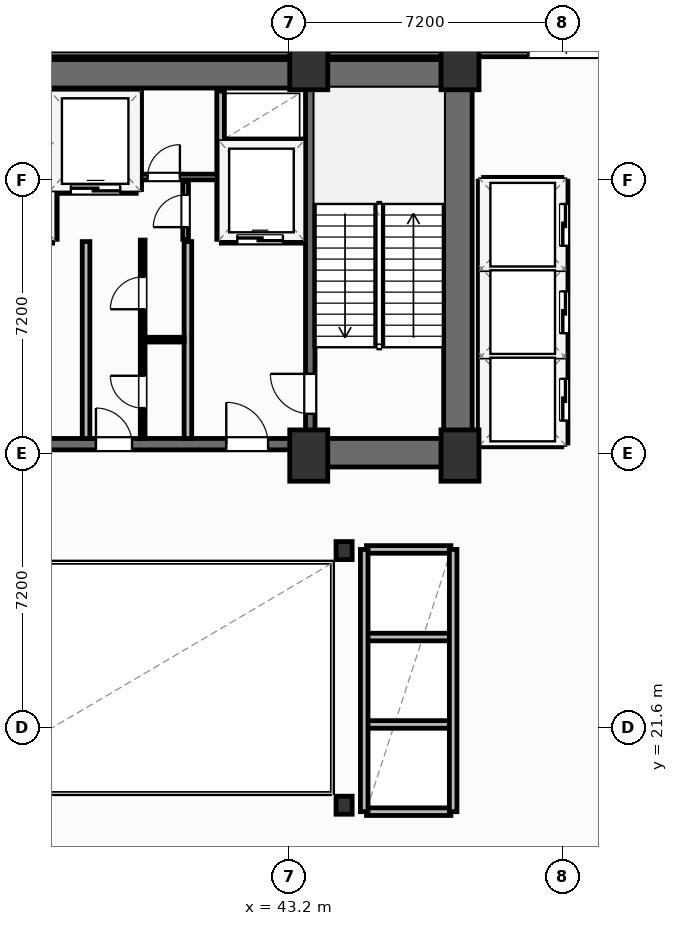
"""IFC4 building model, lengths in metres.
Left out: names, types, materials, properties, quantities, classifications, styles, units other than length and angle.
Written with IfcOpenShell. Run it as: python <this file> out.ifc"""

import sys

from ifc_helpers import new_model, si_unit, direction, frame, frame_2d, origin, origin_2d, place, context, subcontext, project, spatial, rectangle, i_section, extrude, element, fill, save


model = new_model("IFC4")
c1 = context("Model", 3, precision=1e-05, world=origin(), true_north=direction((0.0, 1.0)))
c2 = subcontext(c1, "Body", "Model", "MODEL_VIEW")
j1 = project(units=[si_unit("LENGTHUNIT", "METRE"), si_unit("PLANEANGLEUNIT", "RADIAN")], contexts=[c1])
p1 = place(None, origin())
s1 = spatial("IfcSite", under=j1, at=p1, CompositionType="ELEMENT")
p2 = place(p1, origin())
s2 = spatial("IfcBuilding", under=s1, at=p2, CompositionType="ELEMENT")
p3 = place(p2, frame((0.0, 0.0, 116.9)))
s3 = spatial("IfcBuildingStorey", under=s2, at=p3, CompositionType="ELEMENT", Elevation=116.9)
for number, where, z_axis, x_axis in (
    (1, (43.72, 28.75, 0.0), (0.0, 0.0, 1.0), (1.0, 0.0, 0.0)),
    (2, (47.7, 28.75, 0.0), (0.0, 0.0, 1.0), (1.0, 0.0, 0.0)),
    (3, (43.72, 39.05, 0.0), (0.0, 0.0, 1.0), (1.0, 0.0, 0.0)),
    (4, (47.7, 39.05, 0.0), (0.0, 0.0, 1.0), (1.0, 0.0, 0.0)),
):
    element("IfcColumn", number, at=place(p3, frame(where, z_axis=z_axis, x_axis=x_axis)), inside=s3, PredefinedType="COLUMN", context=c2, shape_type="SweptSolid", body=[
        extrude(rectangle(XDim=1.0, YDim=1.35, at=origin_2d()), origin(), (0.0, 0.0, 1.0), 4.8),
    ])
for number, where, z_axis, x_axis in (
    (5, (44.65, 19.55, 0.0), (0.0, 0.0, 1.0), (1.0, 0.0, 0.0)),
    (6, (44.65, 26.25, 0.0), (0.0, 0.0, 1.0), (1.0, 0.0, 0.0)),
):
    element("IfcColumn", number, at=place(p3, frame(where, z_axis=z_axis, x_axis=x_axis)), inside=s3, PredefinedType="COLUMN", context=c2, shape_type="SweptSolid", body=[
        extrude(i_section(OverallWidth=0.424, OverallDepth=0.474, WebThickness=0.048, FlangeThickness=0.077, FilletRadius=0.025, at=origin_2d()), origin(), (0.0, 0.0, 1.0), 4.8),
    ])
p4 = place(p3, frame((30.38, 38.795, 0.0), z_axis=(0.0, 0.0, 1.0), x_axis=(1.0, 0.0, 0.0)))
e7 = element("IfcWall", 7, at=p4, inside=s3, PredefinedType="SHEAR", context=c2, shape_type="SweptSolid", body=[
    extrude(rectangle(XDim=17.64, YDim=0.75, at=frame_2d((8.82, 0.0))), origin(), (0.0, 0.0, 1.0), 4.55),
])
p5 = place(p3, frame((47.645, 29.2, 0.0), z_axis=(0.0, 0.0, 1.0), x_axis=(0.0, 1.0, 0.0)))
e8 = element("IfcWall", 8, at=p5, inside=s3, PredefinedType="SHEAR", context=c2, shape_type="SweptSolid", body=[
    extrude(rectangle(XDim=9.22, YDim=0.75, at=frame_2d((4.61, 0.0))), origin(), (0.0, 0.0, 1.0), 4.55),
])
p6 = place(p3, frame((43.6, 28.825, 0.0), z_axis=(0.0, 0.0, 1.0), x_axis=(1.0, 0.0, 0.0)))
e9 = element("IfcWall", 9, at=p6, inside=s3, PredefinedType="SHEAR", context=c2, shape_type="SweptSolid", body=[
    extrude(rectangle(XDim=4.42, YDim=0.75, at=frame_2d((2.21, 0.0))), origin(), (0.0, 0.0, 1.0), 4.55),
])
p7 = place(p3, frame((34.8, 29.05, 0.0), z_axis=(0.0, 0.0, 1.0), x_axis=(1.0, 0.0, 0.0)))
e10 = element("IfcWall", 10, at=p7, inside=s3, PredefinedType="SHEAR", context=c2, shape_type="SweptSolid", body=[
    extrude(rectangle(XDim=8.8, YDim=0.3, at=frame_2d((4.4, 0.0))), origin(), (0.0, 0.0, 1.0), 4.55),
])
p8 = place(p7, frame((0.95, 0.0, 0.0)))
e11 = element("IfcOpeningElement", 11, at=p8, cuts=e10, PredefinedType="OPENING", context=c2, shape_type="SweptSolid", body=[
    extrude(rectangle(XDim=1.1, YDim=2.15, at=frame_2d((0.55, 1.075))), frame((0.0, 0.16, 0.0), z_axis=(0.0, -1.0, 0.0), x_axis=(1.0, 0.0, 0.0)), (0.0, 0.0, 1.0), 0.32),
])
p9 = place(p7, frame((6.75, 0.0, 0.0)))
e12 = element("IfcOpeningElement", 12, at=p9, cuts=e10, PredefinedType="OPENING", context=c2, shape_type="SweptSolid", body=[
    extrude(rectangle(XDim=1.1, YDim=2.15, at=frame_2d((0.55, 1.075))), frame((0.0, 0.16, 0.0), z_axis=(0.0, -1.0, 0.0), x_axis=(1.0, 0.0, 0.0)), (0.0, 0.0, 1.0), 0.32),
])
p10 = place(p7, frame((3.32, 0.0, 0.0)))
e13 = element("IfcOpeningElement", 13, at=p10, cuts=e10, PredefinedType="OPENING", context=c2, shape_type="SweptSolid", body=[
    extrude(rectangle(XDim=0.95, YDim=2.15, at=frame_2d((0.475, 1.075))), frame((0.0, 0.16, 0.0), z_axis=(0.0, -1.0, 0.0), x_axis=(1.0, 0.0, 0.0)), (0.0, 0.0, 1.0), 0.32),
])
p11 = place(p3, frame((43.76, 29.2, 0.0), z_axis=(0.0, 0.0, 1.0), x_axis=(0.0, 1.0, 0.0)))
e14 = element("IfcWall", 14, at=p11, inside=s3, PredefinedType="SHEAR", context=c2, shape_type="SweptSolid", body=[
    extrude(rectangle(XDim=9.22, YDim=0.25, at=frame_2d((4.61, 0.0))), origin(), (0.0, 0.0, 1.0), 4.55),
])
p12 = place(p11, frame((0.65, 0.0, 0.0)))
e15 = element("IfcOpeningElement", 15, at=p12, cuts=e14, PredefinedType="OPENING", context=c2, shape_type="SweptSolid", body=[
    extrude(rectangle(XDim=1.05, YDim=2.15, at=frame_2d((0.525, 1.075))), frame((0.0, 0.135, 0.0), z_axis=(0.0, -1.0, 0.0), x_axis=(1.0, 0.0, 0.0)), (0.0, 0.0, 1.0), 0.27),
])
p13 = place(p3, frame((10.0, 39.32, 0.0), z_axis=(0.0, 0.0, 1.0), x_axis=(1.0, 0.0, 0.0)))
e16 = element("IfcWall", 16, at=p13, inside=s3, PredefinedType="PARTITIONING", context=c2, shape_type="SweptSolid", body=[
    extrude(rectangle(XDim=62.0, YDim=0.15, at=frame_2d((31.0, 0.0))), origin(), (0.0, 0.0, 1.0), 4.55),
])
p14 = place(p13, frame((15.6, 0.0, 0.0)))
e17 = element("IfcOpeningElement", 17, at=p14, cuts=e16, PredefinedType="OPENING", context=c2, shape_type="SweptSolid", body=[
    extrude(rectangle(XDim=1.0, YDim=2.05, at=frame_2d((0.5, 1.025))), frame((0.0, 0.085, 0.0), z_axis=(0.0, -1.0, 0.0), x_axis=(1.0, 0.0, 0.0)), (0.0, 0.0, 1.0), 0.17),
])
p15 = place(p13, frame((39.5, 0.0, 0.0)))
e18 = element("IfcOpeningElement", 18, at=p15, cuts=e16, PredefinedType="OPENING", context=c2, shape_type="SweptSolid", body=[
    extrude(rectangle(XDim=2.0, YDim=2.05, at=frame_2d((1.0, 1.025))), frame((0.0, 0.085, 0.0), z_axis=(0.0, -1.0, 0.0), x_axis=(1.0, 0.0, 0.0)), (0.0, 0.0, 1.0), 0.17),
])
p16 = place(p3, frame((44.15, 39.32, 0.0), z_axis=(0.0, 0.0, 1.0), x_axis=(0.0, 1.0, 0.0)))
e19 = element("IfcWall", 19, at=p16, inside=s3, PredefinedType="PARTITIONING", context=c2, shape_type="SweptSolid", body=[
    extrude(rectangle(XDim=6.594, YDim=0.15, at=frame_2d((3.297, 0.0))), origin(), (0.0, 0.0, 1.0), 4.55),
])
for number, where, z_axis, x_axis in (
    (20, (37.86, 29.2, 0.0), (0.0, 0.0, 1.0), (0.0, 1.0, 0.0)),
    (21, (40.54, 29.2, 0.0), (0.0, 0.0, 1.0), (0.0, 1.0, 0.0)),
):
    element("IfcWall", number, at=place(p3, frame(where, z_axis=z_axis, x_axis=x_axis)), inside=s3, PredefinedType="PARTITIONING", context=c2, shape_type="SweptSolid", body=[
        extrude(rectangle(XDim=5.18, YDim=0.2, at=frame_2d((2.59, 0.0))), origin(), (0.0, 0.0, 1.0), 4.55),
    ])
p17 = place(p3, frame((37.0, 34.44, 0.0), z_axis=(0.0, 0.0, 1.0), x_axis=(0.0, 1.0, 0.0)))
e22 = element("IfcWall", 22, at=p17, inside=s3, PredefinedType="PARTITIONING", context=c2, shape_type="SweptSolid", body=[
    extrude(rectangle(XDim=3.9, YDim=0.2, at=frame_2d((1.95, 0.0))), origin(), (0.0, 0.0, 1.0), 4.55),
])
p18 = place(p3, frame((41.42, 34.44, 0.0), z_axis=(0.0, 0.0, 1.0), x_axis=(1.0, 0.0, 0.0)))
e23 = element("IfcWall", 23, at=p18, inside=s3, PredefinedType="PARTITIONING", context=c2, shape_type="SweptSolid", body=[
    extrude(rectangle(XDim=2.18, YDim=0.2, at=frame_2d((1.09, 0.0))), origin(), (0.0, 0.0, 1.0), 4.55),
])
p19 = place(p18, frame((0.42, 0.0, 0.0)))
e24 = element("IfcOpeningElement", 24, at=p19, cuts=e23, PredefinedType="OPENING", context=c2, shape_type="SweptSolid", body=[
    extrude(rectangle(XDim=1.2, YDim=2.2, at=frame_2d((0.6, 1.1))), frame((0.0, 0.11, 0.0), z_axis=(0.0, -1.0, 0.0), x_axis=(1.0, 0.0, 0.0)), (0.0, 0.0, 1.0), 0.22),
])
p20 = place(p3, frame((41.42, 36.98, 0.0), z_axis=(0.0, 0.0, 1.0), x_axis=(1.0, 0.0, 0.0)))
e25 = element("IfcWall", 25, at=p20, inside=s3, PredefinedType="PARTITIONING", context=c2, shape_type="SweptSolid", body=[
    extrude(rectangle(XDim=2.18, YDim=0.2, at=frame_2d((1.09, 0.0))), origin(), (0.0, 0.0, 1.0), 4.55),
])
p21 = place(p3, frame((41.4, 34.44, 0.0), z_axis=(0.0, 0.0, 1.0), x_axis=(0.0, 1.0, 0.0)))
e26 = element("IfcWall", 26, at=p21, inside=s3, PredefinedType="PARTITIONING", context=c2, shape_type="SweptSolid", body=[
    extrude(rectangle(XDim=3.9, YDim=0.2, at=frame_2d((1.95, 0.0))), origin(), (0.0, 0.0, 1.0), 4.55),
])
p22 = place(p3, frame((37.06, 35.75, 0.0), z_axis=(0.0, 0.0, 1.0), x_axis=(1.0, 0.0, 0.0)))
e27 = element("IfcWall", 27, at=p22, inside=s3, PredefinedType="PARTITIONING", context=c2, shape_type="SweptSolid", body=[
    extrude(rectangle(XDim=2.12, YDim=0.2, at=frame_2d((1.06, 0.0))), origin(), (0.0, 0.0, 1.0), 4.55),
])
p23 = place(p22, frame((0.4, 0.0, 0.0)))
e28 = element("IfcOpeningElement", 28, at=p23, cuts=e27, PredefinedType="OPENING", context=c2, shape_type="SweptSolid", body=[
    extrude(rectangle(XDim=1.3, YDim=2.2, at=frame_2d((0.65, 1.1))), frame((0.0, 0.11, 0.0), z_axis=(0.0, -1.0, 0.0), x_axis=(1.0, 0.0, 0.0)), (0.0, 0.0, 1.0), 0.22),
])
p24 = place(p3, frame((39.22, 35.75, 0.0), z_axis=(0.0, 0.0, 1.0), x_axis=(0.0, 1.0, 0.0)))
e29 = element("IfcWall", 29, at=p24, inside=s3, PredefinedType="PARTITIONING", context=c2, shape_type="SweptSolid", body=[
    extrude(rectangle(XDim=2.59, YDim=0.2, at=frame_2d((1.295, 0.0))), origin(), (0.0, 0.0, 1.0), 4.55),
])
p25 = place(p3, frame((39.3, 36.08, 0.0), z_axis=(0.0, 0.0, 1.0), x_axis=(1.0, 0.0, 0.0)))
e30 = element("IfcWall", 30, at=p25, inside=s3, PredefinedType="PARTITIONING", context=c2, shape_type="SweptSolid", body=[
    extrude(rectangle(XDim=2.02, YDim=0.15, at=frame_2d((1.01, 0.0))), origin(), (0.0, 0.0, 1.0), 4.55),
])
p26 = place(p25, frame((0.18, 0.0, 0.0)))
e31 = element("IfcOpeningElement", 31, at=p26, cuts=e30, PredefinedType="OPENING", context=c2, shape_type="SweptSolid", body=[
    extrude(rectangle(XDim=0.85, YDim=2.05, at=frame_2d((0.425, 1.025))), frame((0.0, 0.085, 0.0), z_axis=(0.0, -1.0, 0.0), x_axis=(1.0, 0.0, 0.0)), (0.0, 0.0, 1.0), 0.17),
])
p27 = place(p3, frame((40.48, 34.44, 0.0), z_axis=(0.0, 0.0, 1.0), x_axis=(0.0, 1.0, 0.0)))
e32 = element("IfcWall", 32, at=p27, inside=s3, PredefinedType="PARTITIONING", context=c2, shape_type="SweptSolid", body=[
    extrude(rectangle(XDim=1.52, YDim=0.15, at=frame_2d((0.76, 0.0))), origin(), (0.0, 0.0, 1.0), 4.55),
])
p28 = place(p27, frame((0.32, 0.0, 0.0)))
e33 = element("IfcOpeningElement", 33, at=p28, cuts=e32, PredefinedType="OPENING", context=c2, shape_type="SweptSolid", body=[
    extrude(rectangle(XDim=0.85, YDim=2.05, at=frame_2d((0.425, 1.025))), frame((0.0, 0.085, 0.0), z_axis=(0.0, -1.0, 0.0), x_axis=(1.0, 0.0, 0.0)), (0.0, 0.0, 1.0), 0.17),
])
p29 = place(p3, frame((39.35, 31.8, 0.0), z_axis=(0.0, 0.0, 1.0), x_axis=(1.0, 0.0, 0.0)))
e34 = element("IfcWall", 34, at=p29, inside=s3, PredefinedType="PARTITIONING", context=c2, shape_type="SweptSolid", body=[
    extrude(rectangle(XDim=1.09, YDim=0.125, at=frame_2d((0.545, 0.0))), origin(), (0.0, 0.0, 1.0), 4.55),
])
p30 = place(p3, frame((39.35, 29.2, 0.0), z_axis=(0.0, 0.0, 1.0), x_axis=(0.0, 1.0, 0.0)))
e35 = element("IfcWall", 35, at=p30, inside=s3, PredefinedType="PARTITIONING", context=c2, shape_type="SweptSolid", body=[
    extrude(rectangle(XDim=5.22, YDim=0.125, at=frame_2d((2.61, 0.0))), origin(), (0.0, 0.0, 1.0), 4.55),
])
p31 = place(p30, frame((0.8, 0.0, 0.0)))
e36 = element("IfcOpeningElement", 36, at=p31, cuts=e35, PredefinedType="OPENING", context=c2, shape_type="SweptSolid", body=[
    extrude(rectangle(XDim=0.85, YDim=2.05, at=frame_2d((0.425, 1.025))), frame((0.0, 0.073, 0.0), z_axis=(0.0, -1.0, 0.0), x_axis=(1.0, 0.0, 0.0)), (0.0, 0.0, 1.0), 0.145),
])
p32 = place(p30, frame((3.4, 0.0, 0.0)))
e37 = element("IfcOpeningElement", 37, at=p32, cuts=e35, PredefinedType="OPENING", context=c2, shape_type="SweptSolid", body=[
    extrude(rectangle(XDim=0.85, YDim=2.05, at=frame_2d((0.425, 1.025))), frame((0.0, 0.073, 0.0), z_axis=(0.0, -1.0, 0.0), x_axis=(1.0, 0.0, 0.0)), (0.0, 0.0, 1.0), 0.145),
])
for number, where, z_axis, x_axis in (
    (38, (48.32, 31.375, 0.0), (0.0, 0.0, 1.0), (1.0, 0.0, 0.0)),
    (39, (48.32, 33.675, 0.0), (0.0, 0.0, 1.0), (1.0, 0.0, 0.0)),
):
    element("IfcWall", number, at=place(p3, frame(where, z_axis=z_axis, x_axis=x_axis)), inside=s3, PredefinedType="PARTITIONING", context=c2, shape_type="SweptSolid", body=[
        extrude(rectangle(XDim=2.06, YDim=0.2, at=frame_2d((1.03, 0.0))), origin(), (0.0, 0.0, 1.0), 4.55),
    ])
p33 = place(p3, frame((48.32, 29.08, 0.0), z_axis=(0.0, 0.0, 1.0), x_axis=(1.0, 0.0, 0.0)))
e40 = element("IfcWall", 40, at=p33, inside=s3, PredefinedType="PARTITIONING", context=c2, shape_type="SweptSolid", body=[
    extrude(rectangle(XDim=2.06, YDim=0.2, at=frame_2d((1.03, 0.0))), origin(), (0.0, 0.0, 1.0), 3.762),
])
p34 = place(p3, frame((48.32, 35.97, 0.0), z_axis=(0.0, 0.0, 1.0), x_axis=(1.0, 0.0, 0.0)))
e41 = element("IfcWall", 41, at=p34, inside=s3, PredefinedType="PARTITIONING", context=c2, shape_type="SweptSolid", body=[
    extrude(rectangle(XDim=2.06, YDim=0.2, at=frame_2d((1.03, 0.0))), origin(), (0.0, 0.0, 1.0), 4.55),
])
p35 = place(p3, frame((48.28, 29.08, 0.0), z_axis=(0.0, 0.0, 1.0), x_axis=(0.0, 1.0, 0.0)))
e42 = element("IfcWall", 42, at=p35, inside=s3, PredefinedType="PARTITIONING", context=c2, shape_type="SweptSolid", body=[
    extrude(rectangle(XDim=6.89, YDim=0.2, at=frame_2d((3.445, 0.0))), origin(), (0.0, 0.0, 1.0), 4.55),
])
p36 = place(p3, frame((50.44, 29.08, 0.0), z_axis=(0.0, 0.0, 1.0), x_axis=(0.0, 1.0, 0.0)))
e43 = element("IfcWall", 43, at=p36, inside=s3, PredefinedType="PARTITIONING", context=c2, shape_type="SweptSolid", body=[
    extrude(rectangle(XDim=6.89, YDim=0.2, at=frame_2d((3.445, 0.0))), origin(), (0.0, 0.0, 1.0), 4.55),
])
p37 = place(p36, frame((0.59, 0.0, 0.0)))
e44 = element("IfcOpeningElement", 44, at=p37, cuts=e43, PredefinedType="OPENING", context=c2, shape_type="SweptSolid", body=[
    extrude(rectangle(XDim=1.1, YDim=2.15, at=frame_2d((0.55, 1.075))), frame((0.0, 0.11, 0.0), z_axis=(0.0, -1.0, 0.0), x_axis=(1.0, 0.0, 0.0)), (0.0, 0.0, 1.0), 0.22),
])
p38 = place(p36, frame((2.89, 0.0, 0.0)))
e45 = element("IfcOpeningElement", 45, at=p38, cuts=e43, PredefinedType="OPENING", context=c2, shape_type="SweptSolid", body=[
    extrude(rectangle(XDim=1.1, YDim=2.15, at=frame_2d((0.55, 1.075))), frame((0.0, 0.11, 0.0), z_axis=(0.0, -1.0, 0.0), x_axis=(1.0, 0.0, 0.0)), (0.0, 0.0, 1.0), 0.22),
])
p39 = place(p36, frame((5.19, 0.0, 0.0)))
e46 = element("IfcOpeningElement", 46, at=p39, cuts=e43, PredefinedType="OPENING", context=c2, shape_type="SweptSolid", body=[
    extrude(rectangle(XDim=1.1, YDim=2.15, at=frame_2d((0.55, 1.075))), frame((0.0, 0.11, 0.0), z_axis=(0.0, -1.0, 0.0), x_axis=(1.0, 0.0, 0.0)), (0.0, 0.0, 1.0), 0.22),
])
for number, where, z_axis, x_axis in (
    (47, (45.24, 21.675, 0.0), (0.0, 0.0, 1.0), (1.0, 0.0, 0.0)),
    (48, (45.24, 23.975, 0.0), (0.0, 0.0, 1.0), (1.0, 0.0, 0.0)),
):
    element("IfcWall", number, at=place(p3, frame(where, z_axis=z_axis, x_axis=x_axis)), inside=s3, PredefinedType="PARTITIONING", context=c2, shape_type="SweptSolid", body=[
        extrude(rectangle(XDim=2.22, YDim=0.2, at=frame_2d((1.11, 0.0))), origin(), (0.0, 0.0, 1.0), 4.55),
    ])
p40 = place(p3, frame((45.24, 19.38, 0.0), z_axis=(0.0, 0.0, 1.0), x_axis=(1.0, 0.0, 0.0)))
e49 = element("IfcWall", 49, at=p40, inside=s3, PredefinedType="PARTITIONING", context=c2, shape_type="SweptSolid", body=[
    extrude(rectangle(XDim=2.22, YDim=0.2, at=frame_2d((1.11, 0.0))), origin(), (0.0, 0.0, 1.0), 3.762),
])
p41 = place(p3, frame((45.24, 26.28, 0.0), z_axis=(0.0, 0.0, 1.0), x_axis=(1.0, 0.0, 0.0)))
e50 = element("IfcWall", 50, at=p41, inside=s3, PredefinedType="PARTITIONING", context=c2, shape_type="SweptSolid", body=[
    extrude(rectangle(XDim=2.22, YDim=0.2, at=frame_2d((1.11, 0.0))), origin(), (0.0, 0.0, 1.0), 4.55),
])
for number, where, z_axis, x_axis in (
    (51, (45.18, 19.38, 0.0), (0.0, 0.0, 1.0), (0.0, 1.0, 0.0)),
    (52, (47.52, 19.38, 0.0), (0.0, 0.0, 1.0), (0.0, 1.0, 0.0)),
):
    element("IfcWall", number, at=place(p3, frame(where, z_axis=z_axis, x_axis=x_axis)), inside=s3, PredefinedType="PARTITIONING", context=c2, shape_type="SweptSolid", body=[
        extrude(rectangle(XDim=6.9, YDim=0.2, at=frame_2d((3.45, 0.0))), origin(), (0.0, 0.0, 1.0), 4.55),
    ])
p42 = place(p15, origin())
e53 = element("IfcDoor", 53, at=p42, inside=s3, OperationType="DOUBLE_DOOR_SINGLE_SWING", PredefinedType="DOOR", context=c2, shape_type="SweptSolid", body=[
    extrude(rectangle(XDim=2.0, YDim=2.05, at=frame_2d((1.0, 1.025))), frame((0.0, 0.025, 0.0), z_axis=(0.0, -1.0, 0.0), x_axis=(1.0, 0.0, 0.0)), (0.0, 0.0, 1.0), 0.05),
])
fill(e18, e53)
p43 = place(p12, origin())
e54 = element("IfcDoor", 54, at=p43, inside=s3, OperationType="SINGLE_SWING_RIGHT", PredefinedType="DOOR", context=c2, shape_type="SweptSolid", body=[
    extrude(rectangle(XDim=1.05, YDim=2.15, at=frame_2d((0.525, 1.075))), frame((0.0, 0.025, 0.0), z_axis=(0.0, -1.0, 0.0), x_axis=(1.0, 0.0, 0.0)), (0.0, 0.0, 1.0), 0.05),
])
fill(e15, e54)
p44 = place(p9, origin())
e55 = element("IfcDoor", 55, at=p44, inside=s3, OperationType="SINGLE_SWING_LEFT", PredefinedType="DOOR", context=c2, shape_type="SweptSolid", body=[
    extrude(rectangle(XDim=1.1, YDim=2.15, at=frame_2d((0.55, 1.075))), frame((0.0, 0.025, 0.0), z_axis=(0.0, -1.0, 0.0), x_axis=(1.0, 0.0, 0.0)), (0.0, 0.0, 1.0), 0.05),
])
fill(e12, e55)
p45 = place(p19, origin())
e56 = element("IfcDoor", 56, at=p45, inside=s3, OperationType="SLIDING_TO_LEFT", PredefinedType="DOOR", context=c2, shape_type="SweptSolid", body=[
    extrude(rectangle(XDim=1.2, YDim=2.2, at=frame_2d((0.6, 1.1))), frame((0.0, 0.025, 0.0), z_axis=(0.0, -1.0, 0.0), x_axis=(1.0, 0.0, 0.0)), (0.0, 0.0, 1.0), 0.05),
])
fill(e24, e56)
p46 = place(p23, origin())
e57 = element("IfcDoor", 57, at=p46, inside=s3, OperationType="SLIDING_TO_LEFT", PredefinedType="DOOR", context=c2, shape_type="SweptSolid", body=[
    extrude(rectangle(XDim=1.3, YDim=2.2, at=frame_2d((0.65, 1.1))), frame((0.0, 0.025, 0.0), z_axis=(0.0, -1.0, 0.0), x_axis=(1.0, 0.0, 0.0)), (0.0, 0.0, 1.0), 0.05),
])
fill(e28, e57)
p47 = place(p26, origin())
e58 = element("IfcDoor", 58, at=p47, inside=s3, OperationType="SINGLE_SWING_RIGHT", PredefinedType="DOOR", context=c2, shape_type="SweptSolid", body=[
    extrude(rectangle(XDim=0.85, YDim=2.05, at=frame_2d((0.425, 1.025))), frame((0.0, 0.025, 0.0), z_axis=(0.0, -1.0, 0.0), x_axis=(1.0, 0.0, 0.0)), (0.0, 0.0, 1.0), 0.05),
])
fill(e31, e58)
p48 = place(p28, origin())
e59 = element("IfcDoor", 59, at=p48, inside=s3, OperationType="SINGLE_SWING_LEFT", PredefinedType="DOOR", context=c2, shape_type="SweptSolid", body=[
    extrude(rectangle(XDim=0.85, YDim=2.05, at=frame_2d((0.425, 1.025))), frame((0.0, 0.025, 0.0), z_axis=(0.0, -1.0, 0.0), x_axis=(1.0, 0.0, 0.0)), (0.0, 0.0, 1.0), 0.05),
])
fill(e33, e59)
p49 = place(p31, origin())
e60 = element("IfcDoor", 60, at=p49, inside=s3, OperationType="SINGLE_SWING_RIGHT", PredefinedType="DOOR", context=c2, shape_type="SweptSolid", body=[
    extrude(rectangle(XDim=0.85, YDim=2.05, at=frame_2d((0.425, 1.025))), frame((0.0, 0.025, 0.0), z_axis=(0.0, -1.0, 0.0), x_axis=(1.0, 0.0, 0.0)), (0.0, 0.0, 1.0), 0.05),
])
fill(e36, e60)
p50 = place(p32, origin())
e61 = element("IfcDoor", 61, at=p50, inside=s3, OperationType="SINGLE_SWING_LEFT", PredefinedType="DOOR", context=c2, shape_type="SweptSolid", body=[
    extrude(rectangle(XDim=0.85, YDim=2.05, at=frame_2d((0.425, 1.025))), frame((0.0, 0.025, 0.0), z_axis=(0.0, -1.0, 0.0), x_axis=(1.0, 0.0, 0.0)), (0.0, 0.0, 1.0), 0.05),
])
fill(e37, e61)
p51 = place(p10, origin())
e62 = element("IfcDoor", 62, at=p51, inside=s3, OperationType="SINGLE_SWING_LEFT", PredefinedType="DOOR", context=c2, shape_type="SweptSolid", body=[
    extrude(rectangle(XDim=0.95, YDim=2.15, at=frame_2d((0.475, 1.075))), frame((0.0, 0.025, 0.0), z_axis=(0.0, -1.0, 0.0), x_axis=(1.0, 0.0, 0.0)), (0.0, 0.0, 1.0), 0.05),
])
fill(e13, e62)
p52 = place(p37, origin())
e63 = element("IfcDoor", 63, at=p52, inside=s3, OperationType="SLIDING_TO_LEFT", PredefinedType="DOOR", context=c2, shape_type="SweptSolid", body=[
    extrude(rectangle(XDim=1.1, YDim=2.15, at=frame_2d((0.55, 1.075))), frame((0.0, 0.025, 0.0), z_axis=(0.0, -1.0, 0.0), x_axis=(1.0, 0.0, 0.0)), (0.0, 0.0, 1.0), 0.05),
])
fill(e44, e63)
p53 = place(p38, origin())
e64 = element("IfcDoor", 64, at=p53, inside=s3, OperationType="SLIDING_TO_LEFT", PredefinedType="DOOR", context=c2, shape_type="SweptSolid", body=[
    extrude(rectangle(XDim=1.1, YDim=2.15, at=frame_2d((0.55, 1.075))), frame((0.0, 0.025, 0.0), z_axis=(0.0, -1.0, 0.0), x_axis=(1.0, 0.0, 0.0)), (0.0, 0.0, 1.0), 0.05),
])
fill(e45, e64)
p54 = place(p39, origin())
e65 = element("IfcDoor", 65, at=p54, inside=s3, OperationType="SLIDING_TO_LEFT", PredefinedType="DOOR", context=c2, shape_type="SweptSolid", body=[
    extrude(rectangle(XDim=1.1, YDim=2.15, at=frame_2d((0.55, 1.075))), frame((0.0, 0.025, 0.0), z_axis=(0.0, -1.0, 0.0), x_axis=(1.0, 0.0, 0.0)), (0.0, 0.0, 1.0), 0.05),
])
fill(e46, e65)
save(model, sys.argv[1])
